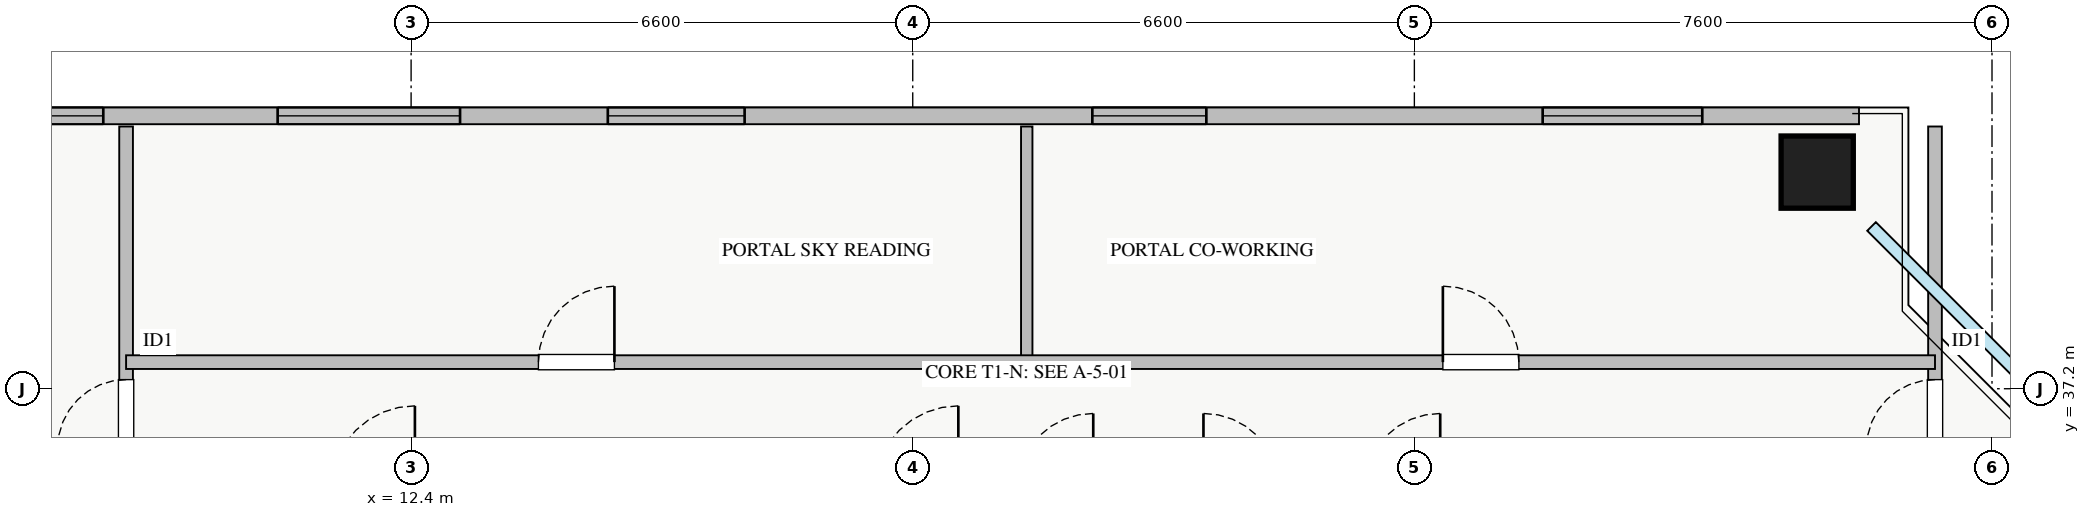
"""IFC4 building model, lengths in metres.
Left out: names, types, materials, properties, quantities, classifications, styles, units other than length and angle.
Written with IfcOpenShell. Run it as: python <this file> out.ifc"""

import sys

from ifc_helpers import new_model, si_unit, direction, frame, frame_2d, origin, origin_2d, place, context, subcontext, project, spatial, rectangle, extrude, source, transform, mapped, element, fill, save


model = new_model("IFC4")
c1 = context("Model", 3, precision=1e-05, world=origin(), true_north=direction((0.0, 1.0)))
c2 = subcontext(c1, "Body", "Model", "MODEL_VIEW")
j1 = project(units=[si_unit("LENGTHUNIT", "METRE"), si_unit("PLANEANGLEUNIT", "RADIAN")], contexts=[c1])
p1 = place(None, origin())
s1 = spatial("IfcSite", under=j1, at=p1, CompositionType="ELEMENT")
p2 = place(p1, origin())
s2 = spatial("IfcBuilding", under=s1, at=p2, CompositionType="ELEMENT")
p3 = place(p2, frame((0.0, 0.0, 156.75)))
s3 = spatial("IfcBuildingStorey", under=s2, at=p3, CompositionType="ELEMENT", Elevation=156.75)
m1 = source(origin(), c2, "Body", "SweptSolid", [
    extrude(rectangle(XDim=0.95, YDim=0.95, at=origin_2d()), origin(), (0.0, 0.0, 1.0), 3.25),
])
p4 = place(p3, frame((30.9, 40.05, 0.0), z_axis=(0.0, 0.0, 1.0), x_axis=(1.0, 0.0, 0.0)))
e1 = element("IfcColumn", 1, at=p4, inside=s3, PredefinedType="COLUMN", context=c2, shape_type="MappedRepresentation", body=[
    mapped(m1, transform((0.0, 0.0, 0.0), x_axis=(1.0, 0.0, 0.0), y_axis=(0.0, 1.0, 0.0), z_axis=(0.0, 0.0, 1.0), scale=1.0)),
])
p5 = place(p3, frame((6.55, 40.79, 0.0), z_axis=(0.0, 0.0, 1.0), x_axis=(1.0, 0.0, 0.0)))
e2 = element("IfcWall", 2, at=p5, inside=s3, PredefinedType="STANDARD", context=c2, shape_type="SweptSolid", body=[
    extrude(rectangle(XDim=24.9, YDim=0.22, at=frame_2d((12.45, 0.0))), origin(), (0.0, 0.0, 1.0), 2.61),
])
p6 = place(p5, frame((0.3, 0.0, 0.9)))
e3 = element("IfcOpeningElement", 3, at=p6, cuts=e2, PredefinedType="OPENING", context=c2, shape_type="SweptSolid", body=[
    extrude(rectangle(XDim=1.5, YDim=1.5, at=frame_2d((0.75, 0.75))), frame((0.0, 0.12, 0.0), z_axis=(0.0, -1.0, 0.0), x_axis=(1.0, 0.0, 0.0)), (0.0, 0.0, 1.0), 0.24),
])
p7 = place(p5, frame((8.438, 0.0, 0.9)))
e4 = element("IfcOpeningElement", 4, at=p7, cuts=e2, PredefinedType="OPENING", context=c2, shape_type="SweptSolid", body=[
    extrude(rectangle(XDim=1.8, YDim=1.45, at=frame_2d((0.9, 0.725))), frame((0.0, 0.12, 0.0), z_axis=(0.0, -1.0, 0.0), x_axis=(1.0, 0.0, 0.0)), (0.0, 0.0, 1.0), 0.24),
])
p8 = place(p5, frame((14.813, 0.0, 0.9)))
e5 = element("IfcOpeningElement", 5, at=p8, cuts=e2, PredefinedType="OPENING", context=c2, shape_type="SweptSolid", body=[
    extrude(rectangle(XDim=1.5, YDim=1.45, at=frame_2d((0.75, 0.725))), frame((0.0, 0.12, 0.0), z_axis=(0.0, -1.0, 0.0), x_axis=(1.0, 0.0, 0.0)), (0.0, 0.0, 1.0), 0.24),
])
p9 = place(p5, frame((20.738, 0.0, 0.9)))
e6 = element("IfcOpeningElement", 6, at=p9, cuts=e2, PredefinedType="OPENING", context=c2, shape_type="SweptSolid", body=[
    extrude(rectangle(XDim=2.1, YDim=1.48, at=frame_2d((1.05, 0.74))), frame((0.0, 0.12, 0.0), z_axis=(0.0, -1.0, 0.0), x_axis=(1.0, 0.0, 0.0)), (0.0, 0.0, 1.0), 0.24),
])
p10 = place(p5, frame((4.094, 0.0, 0.9)))
e7 = element("IfcOpeningElement", 7, at=p10, cuts=e2, PredefinedType="OPENING", context=c2, shape_type="SweptSolid", body=[
    extrude(rectangle(XDim=2.4, YDim=1.5, at=frame_2d((1.2, 0.75))), frame((0.0, 0.12, 0.0), z_axis=(0.0, -1.0, 0.0), x_axis=(1.0, 0.0, 0.0)), (0.0, 0.0, 1.0), 0.24),
])
p11 = place(p3, frame((8.65, 29.3, 0.0), z_axis=(0.0, 0.0, 1.0), x_axis=(0.0, 1.0, 0.0)))
e8 = element("IfcWall", 8, at=p11, inside=s3, PredefinedType="PARTITIONING", context=c2, shape_type="SweptSolid", body=[
    extrude(rectangle(XDim=11.35, YDim=0.18, at=frame_2d((5.675, 0.0))), origin(), (0.0, 0.0, 1.0), 3.07),
])
p12 = place(p11, frame((0.915, 0.0, 0.0)))
e9 = element("IfcOpeningElement", 9, at=p12, cuts=e8, PredefinedType="OPENING", context=c2, shape_type="SweptSolid", body=[
    extrude(rectangle(XDim=1.0, YDim=2.05, at=frame_2d((0.5, 1.025))), frame((0.0, 0.1, 0.0), z_axis=(0.0, -1.0, 0.0), x_axis=(1.0, 0.0, 0.0)), (0.0, 0.0, 1.0), 0.2),
])
p13 = place(p11, frame((7.12, 0.0, 0.0)))
e10 = element("IfcOpeningElement", 10, at=p13, cuts=e8, PredefinedType="OPENING", context=c2, shape_type="SweptSolid", body=[
    extrude(rectangle(XDim=0.9, YDim=2.05, at=frame_2d((0.45, 1.025))), frame((0.0, 0.1, 0.0), z_axis=(0.0, -1.0, 0.0), x_axis=(1.0, 0.0, 0.0)), (0.0, 0.0, 1.0), 0.2),
])
p14 = place(p3, frame((32.45, 29.3, 0.0), z_axis=(0.0, 0.0, 1.0), x_axis=(0.0, 1.0, 0.0)))
e11 = element("IfcWall", 11, at=p14, inside=s3, PredefinedType="PARTITIONING", context=c2, shape_type="SweptSolid", body=[
    extrude(rectangle(XDim=11.35, YDim=0.18, at=frame_2d((5.675, 0.0))), origin(), (0.0, 0.0, 1.0), 3.07),
])
p15 = place(p14, frame((1.115, 0.0, 0.0)))
e12 = element("IfcOpeningElement", 12, at=p15, cuts=e11, PredefinedType="OPENING", context=c2, shape_type="SweptSolid", body=[
    extrude(rectangle(XDim=1.0, YDim=2.05, at=frame_2d((0.5, 1.025))), frame((0.0, 0.1, 0.0), z_axis=(0.0, -1.0, 0.0), x_axis=(1.0, 0.0, 0.0)), (0.0, 0.0, 1.0), 0.2),
])
p16 = place(p14, frame((7.12, 0.0, 0.0)))
e13 = element("IfcOpeningElement", 13, at=p16, cuts=e11, PredefinedType="OPENING", context=c2, shape_type="SweptSolid", body=[
    extrude(rectangle(XDim=0.9, YDim=2.05, at=frame_2d((0.45, 1.025))), frame((0.0, 0.1, 0.0), z_axis=(0.0, -1.0, 0.0), x_axis=(1.0, 0.0, 0.0)), (0.0, 0.0, 1.0), 0.2),
])
p17 = place(p3, frame((20.5, 37.55, 0.0), z_axis=(0.0, 0.0, 1.0), x_axis=(0.0, 1.0, 0.0)))
e14 = element("IfcWall", 14, at=p17, inside=s3, PredefinedType="PARTITIONING", context=c2, shape_type="SweptSolid", body=[
    extrude(rectangle(XDim=3.1, YDim=0.15, at=frame_2d((1.55, 0.0))), origin(), (0.0, 0.0, 1.0), 3.07),
])
p18 = place(p3, frame((8.65, 37.55, 0.0), z_axis=(0.0, 0.0, 1.0), x_axis=(1.0, 0.0, 0.0)))
e15 = element("IfcWall", 15, at=p18, inside=s3, PredefinedType="PARTITIONING", context=c2, shape_type="SweptSolid", body=[
    extrude(rectangle(XDim=23.8, YDim=0.18, at=frame_2d((11.9, 0.0))), origin(), (0.0, 0.0, 1.0), 3.07),
])
p19 = place(p18, frame((5.425, 0.0, 0.0)))
e16 = element("IfcOpeningElement", 16, at=p19, cuts=e15, PredefinedType="OPENING", context=c2, shape_type="SweptSolid", body=[
    extrude(rectangle(XDim=1.0, YDim=2.05, at=frame_2d((0.5, 1.025))), frame((0.0, 0.1, 0.0), z_axis=(0.0, -1.0, 0.0), x_axis=(1.0, 0.0, 0.0)), (0.0, 0.0, 1.0), 0.2),
])
p20 = place(p18, frame((17.325, 0.0, 0.0)))
e17 = element("IfcOpeningElement", 17, at=p20, cuts=e15, PredefinedType="OPENING", context=c2, shape_type="SweptSolid", body=[
    extrude(rectangle(XDim=1.0, YDim=2.05, at=frame_2d((0.5, 1.025))), frame((0.0, 0.1, 0.0), z_axis=(0.0, -1.0, 0.0), x_axis=(1.0, 0.0, 0.0)), (0.0, 0.0, 1.0), 0.2),
])
m2 = source(origin(), c2, "Body", "SweptSolid", [
    extrude(rectangle(XDim=1.5, YDim=1.5, at=frame_2d((0.75, 0.75))), frame((0.0, 0.03, 0.0), z_axis=(0.0, -1.0, 0.0), x_axis=(1.0, 0.0, 0.0)), (0.0, 0.0, 1.0), 0.06),
])
p21 = place(p6, origin())
e18 = element("IfcWindow", 18, at=p21, inside=s3, PartitioningType="TRIPLE_PANEL_VERTICAL", PredefinedType="WINDOW", context=c2, shape_type="MappedRepresentation", body=[
    mapped(m2, transform((0.0, 0.0, 0.0), x_axis=(1.0, 0.0, 0.0), y_axis=(0.0, 1.0, 0.0), z_axis=(0.0, 0.0, 1.0), scale=1.0)),
])
fill(e3, e18)
m3 = source(origin(), c2, "Body", "SweptSolid", [
    extrude(rectangle(XDim=1.8, YDim=1.45, at=frame_2d((0.9, 0.725))), frame((0.0, 0.03, 0.0), z_axis=(0.0, -1.0, 0.0), x_axis=(1.0, 0.0, 0.0)), (0.0, 0.0, 1.0), 0.06),
])
p22 = place(p7, origin())
e19 = element("IfcWindow", 19, at=p22, inside=s3, PartitioningType="DOUBLE_PANEL_VERTICAL", PredefinedType="WINDOW", context=c2, shape_type="MappedRepresentation", body=[
    mapped(m3, transform((0.0, 0.0, 0.0), x_axis=(1.0, 0.0, 0.0), y_axis=(0.0, 1.0, 0.0), z_axis=(0.0, 0.0, 1.0), scale=1.0)),
])
fill(e4, e19)
m4 = source(origin(), c2, "Body", "SweptSolid", [
    extrude(rectangle(XDim=1.5, YDim=1.45, at=frame_2d((0.75, 0.725))), frame((0.0, 0.03, 0.0), z_axis=(0.0, -1.0, 0.0), x_axis=(1.0, 0.0, 0.0)), (0.0, 0.0, 1.0), 0.06),
])
p23 = place(p8, origin())
e20 = element("IfcWindow", 20, at=p23, inside=s3, PartitioningType="DOUBLE_PANEL_VERTICAL", PredefinedType="WINDOW", context=c2, shape_type="MappedRepresentation", body=[
    mapped(m4, transform((0.0, 0.0, 0.0), x_axis=(1.0, 0.0, 0.0), y_axis=(0.0, 1.0, 0.0), z_axis=(0.0, 0.0, 1.0), scale=1.0)),
])
fill(e5, e20)
m5 = source(origin(), c2, "Body", "SweptSolid", [
    extrude(rectangle(XDim=2.1, YDim=1.48, at=frame_2d((1.05, 0.74))), frame((0.0, 0.03, 0.0), z_axis=(0.0, -1.0, 0.0), x_axis=(1.0, 0.0, 0.0)), (0.0, 0.0, 1.0), 0.06),
])
p24 = place(p9, origin())
e21 = element("IfcWindow", 21, at=p24, inside=s3, PartitioningType="TRIPLE_PANEL_VERTICAL", PredefinedType="WINDOW", context=c2, shape_type="MappedRepresentation", body=[
    mapped(m5, transform((0.0, 0.0, 0.0), x_axis=(1.0, 0.0, 0.0), y_axis=(0.0, 1.0, 0.0), z_axis=(0.0, 0.0, 1.0), scale=1.0)),
])
fill(e6, e21)
m6 = source(origin(), c2, "Body", "SweptSolid", [
    extrude(rectangle(XDim=0.9, YDim=2.05, at=frame_2d((0.45, 1.025))), frame((0.0, 0.025, 0.0), z_axis=(0.0, -1.0, 0.0), x_axis=(1.0, 0.0, 0.0)), (0.0, 0.0, 1.0), 0.05),
])
p25 = place(p13, origin())
e22 = element("IfcDoor", 22, at=p25, inside=s3, OperationType="SINGLE_SWING_LEFT", PredefinedType="DOOR", context=c2, shape_type="MappedRepresentation", body=[
    mapped(m6, transform((0.0, 0.0, 0.0), x_axis=(1.0, 0.0, 0.0), y_axis=(0.0, 1.0, 0.0), z_axis=(0.0, 0.0, 1.0), scale=1.0)),
])
fill(e10, e22)
p26 = place(p16, origin())
e23 = element("IfcDoor", 23, at=p26, inside=s3, OperationType="SINGLE_SWING_LEFT", PredefinedType="DOOR", context=c2, shape_type="MappedRepresentation", body=[
    mapped(m6, transform((0.0, 0.0, 0.0), x_axis=(1.0, 0.0, 0.0), y_axis=(0.0, 1.0, 0.0), z_axis=(0.0, 0.0, 1.0), scale=1.0)),
])
fill(e13, e23)
m7 = source(origin(), c2, "Body", "SweptSolid", [
    extrude(rectangle(XDim=1.0, YDim=2.05, at=frame_2d((0.5, 1.025))), frame((0.0, 0.025, 0.0), z_axis=(0.0, -1.0, 0.0), x_axis=(1.0, 0.0, 0.0)), (0.0, 0.0, 1.0), 0.05),
])
p27 = place(p19, origin())
e24 = element("IfcDoor", 24, at=p27, inside=s3, OperationType="SINGLE_SWING_RIGHT", PredefinedType="DOOR", context=c2, shape_type="MappedRepresentation", body=[
    mapped(m7, transform((0.0, 0.0, 0.0), x_axis=(1.0, 0.0, 0.0), y_axis=(0.0, 1.0, 0.0), z_axis=(0.0, 0.0, 1.0), scale=1.0)),
])
fill(e16, e24)
p28 = place(p20, origin())
e25 = element("IfcDoor", 25, at=p28, inside=s3, OperationType="SINGLE_SWING_LEFT", PredefinedType="DOOR", context=c2, shape_type="MappedRepresentation", body=[
    mapped(m7, transform((0.0, 0.0, 0.0), x_axis=(1.0, 0.0, 0.0), y_axis=(0.0, 1.0, 0.0), z_axis=(0.0, 0.0, 1.0), scale=1.0)),
])
fill(e17, e25)
m8 = source(origin(), c2, "Body", "SweptSolid", [
    extrude(rectangle(XDim=2.4, YDim=1.5, at=frame_2d((1.2, 0.75))), frame((0.0, 0.03, 0.0), z_axis=(0.0, -1.0, 0.0), x_axis=(1.0, 0.0, 0.0)), (0.0, 0.0, 1.0), 0.06),
])
p29 = place(p10, origin())
e26 = element("IfcWindow", 26, at=p29, inside=s3, PartitioningType="TRIPLE_PANEL_VERTICAL", PredefinedType="WINDOW", context=c2, shape_type="MappedRepresentation", body=[
    mapped(m8, transform((0.0, 0.0, 0.0), x_axis=(1.0, 0.0, 0.0), y_axis=(0.0, 1.0, 0.0), z_axis=(0.0, 0.0, 1.0), scale=1.0)),
])
fill(e7, e26)
save(model, sys.argv[1])
